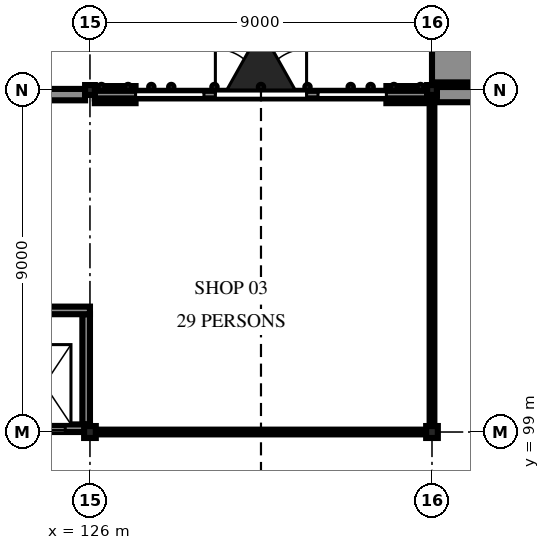
"""IFC4 building model, lengths in metres.
Left out: names, types, materials, properties, quantities, classifications, styles, units other than length and angle.
Written with IfcOpenShell. Run it as: python <this file> out.ifc"""

import sys

from ifc_helpers import new_model, si_unit, direction, frame, frame_2d, origin, origin_2d, place, context, subcontext, project, spatial, polyline, rectangle, i_section, outline, extrude, element, fill, save


model = new_model("IFC4")
c1 = context("Model", 3, precision=1e-05, world=origin(), true_north=direction((0.0, 1.0)))
c2 = subcontext(c1, "Body", "Model", "MODEL_VIEW")
j1 = project(units=[si_unit("LENGTHUNIT", "METRE"), si_unit("PLANEANGLEUNIT", "RADIAN")], contexts=[c1])
p1 = place(None, origin())
s1 = spatial("IfcSite", under=j1, at=p1, CompositionType="ELEMENT")
p2 = place(p1, origin())
s2 = spatial("IfcBuilding", under=s1, at=p2, CompositionType="ELEMENT")
p3 = place(p2, origin())
s3 = spatial("IfcBuildingStorey", under=s2, at=p3, CompositionType="ELEMENT", Elevation=0.0)
p4 = place(p3, frame((126.0, 99.0, -2.1), z_axis=(0.0, 0.0, 1.0), x_axis=(1.0, 0.0, 0.0)))
e1 = element("IfcColumn", 1, at=p4, inside=s3, PredefinedType="COLUMN", context=c2, shape_type="SweptSolid", body=[
    extrude(i_section(OverallWidth=0.307, OverallDepth=0.314, WebThickness=0.012, FlangeThickness=0.019, FilletRadius=0.015, at=origin_2d()), origin(), (0.0, 0.0, 1.0), 9.6),
])
p5 = place(p3, frame((126.0, 108.0, -2.1), z_axis=(0.0, 0.0, 1.0), x_axis=(1.0, 0.0, 0.0)))
e2 = element("IfcColumn", 2, at=p5, inside=s3, PredefinedType="COLUMN", context=c2, shape_type="SweptSolid", body=[
    extrude(i_section(OverallWidth=0.256, OverallDepth=0.26, WebThickness=0.01, FlangeThickness=0.017, FilletRadius=0.013, at=origin_2d()), origin(), (0.0, 0.0, 1.0), 9.6),
])
p6 = place(p3, frame((135.0, 99.0, -2.1), z_axis=(0.0, 0.0, 1.0), x_axis=(1.0, 0.0, 0.0)))
e3 = element("IfcColumn", 3, at=p6, inside=s3, PredefinedType="COLUMN", context=c2, shape_type="SweptSolid", body=[
    extrude(i_section(OverallWidth=0.307, OverallDepth=0.314, WebThickness=0.012, FlangeThickness=0.019, FilletRadius=0.015, at=origin_2d()), origin(), (0.0, 0.0, 1.0), 9.6),
])
p7 = place(p3, frame((135.0, 108.0, -2.1), z_axis=(0.0, 0.0, 1.0), x_axis=(1.0, 0.0, 0.0)))
e4 = element("IfcColumn", 4, at=p7, inside=s3, PredefinedType="COLUMN", context=c2, shape_type="SweptSolid", body=[
    extrude(i_section(OverallWidth=0.256, OverallDepth=0.26, WebThickness=0.01, FlangeThickness=0.017, FilletRadius=0.013, at=origin_2d()), origin(), (0.0, 0.0, 1.0), 9.6),
])
p8 = place(p3, frame((117.128, 107.878, 0.0), z_axis=(0.0, 0.0, 1.0), x_axis=(1.0, 0.0, 0.0)))
e5 = element("IfcWall", 5, at=p8, inside=s3, PredefinedType="SOLIDWALL", context=c2, shape_type="SweptSolid", body=[
    extrude(rectangle(XDim=8.744, YDim=0.3, at=frame_2d((4.372, 0.0))), origin(), (0.0, 0.0, 1.0), 6.692),
])
p9 = place(p8, frame((0.472, 0.0, 0.0)))
e6 = element("IfcOpeningElement", 6, at=p9, cuts=e5, PredefinedType="OPENING", context=c2, shape_type="SweptSolid", body=[
    extrude(rectangle(XDim=1.8, YDim=2.4, at=frame_2d((0.9, 1.2))), frame((0.0, 0.16, 0.0), z_axis=(0.0, -1.0, 0.0), x_axis=(1.0, 0.0, 0.0)), (0.0, 0.0, 1.0), 0.32),
])
p10 = place(p8, frame((0.772, 0.0, 2.55)))
e7 = element("IfcOpeningElement", 7, at=p10, cuts=e5, PredefinedType="OPENING", context=c2, shape_type="SweptSolid", body=[
    extrude(rectangle(XDim=1.2, YDim=0.6, at=frame_2d((0.6, 0.3))), frame((0.0, 0.16, 0.0), z_axis=(0.0, -1.0, 0.0), x_axis=(1.0, 0.0, 0.0)), (0.0, 0.0, 1.0), 0.32),
])
p11 = place(p8, frame((3.922, 0.0, 1.2)))
e8 = element("IfcOpeningElement", 8, at=p11, cuts=e5, PredefinedType="OPENING", context=c2, shape_type="SweptSolid", body=[
    extrude(rectangle(XDim=0.9, YDim=1.8, at=frame_2d((0.45, 0.9))), frame((0.0, 0.16, 0.0), z_axis=(0.0, -1.0, 0.0), x_axis=(1.0, 0.0, 0.0)), (0.0, 0.0, 1.0), 0.32),
])
p12 = place(p3, frame((126.128, 107.878, 0.0), z_axis=(0.0, 0.0, 1.0), x_axis=(1.0, 0.0, 0.0)))
e9 = element("IfcWall", 9, at=p12, inside=s3, PredefinedType="SOLIDWALL", context=c2, shape_type="SweptSolid", body=[
    extrude(rectangle(XDim=1.072, YDim=0.45, at=frame_2d((0.536, 0.0))), origin(), (0.0, 0.0, 1.0), 4.5),
])
p13 = place(p3, frame((129.0, 107.878, 0.0), z_axis=(0.0, 0.0, 1.0), x_axis=(1.0, 0.0, 0.0)))
e10 = element("IfcWall", 10, at=p13, inside=s3, PredefinedType="ELEMENTEDWALL", context=c2, shape_type="SweptSolid", body=[
    extrude(rectangle(XDim=3.0, YDim=0.15, at=frame_2d((1.5, 0.0))), origin(), (0.0, 0.0, 1.0), 4.5),
])
p14 = place(p13, frame((0.3, 0.0, 0.0)))
e11 = element("IfcOpeningElement", 11, at=p14, cuts=e10, PredefinedType="OPENING", context=c2, shape_type="SweptSolid", body=[
    extrude(rectangle(XDim=2.4, YDim=2.7, at=frame_2d((1.2, 1.35))), frame((0.0, 0.085, 0.0), z_axis=(0.0, -1.0, 0.0), x_axis=(1.0, 0.0, 0.0)), (0.0, 0.0, 1.0), 0.17),
])
p15 = place(p3, frame((133.8, 107.878, 0.0), z_axis=(0.0, 0.0, 1.0), x_axis=(1.0, 0.0, 0.0)))
e12 = element("IfcWall", 12, at=p15, inside=s3, PredefinedType="SOLIDWALL", context=c2, shape_type="SweptSolid", body=[
    extrude(rectangle(XDim=1.072, YDim=0.45, at=frame_2d((0.536, 0.0))), origin(), (0.0, 0.0, 1.0), 4.5),
])
p16 = place(p3, frame((126.128, 107.878, 4.9), z_axis=(0.0, 0.0, 1.0), x_axis=(1.0, 0.0, 0.0)))
e13 = element("IfcWall", 13, at=p16, inside=s3, PredefinedType="SOLIDWALL", context=c2, shape_type="SweptSolid", body=[
    extrude(rectangle(XDim=8.744, YDim=0.2, at=frame_2d((4.372, 0.0))), origin(), (0.0, 0.0, 1.0), 1.792),
])
p17 = place(p3, frame((135.128, 107.878, 0.0), z_axis=(0.0, 0.0, 1.0), x_axis=(1.0, 0.0, 0.0)))
e14 = element("IfcWall", 14, at=p17, inside=s3, PredefinedType="SOLIDWALL", context=c2, shape_type="SweptSolid", body=[
    extrude(rectangle(XDim=8.744, YDim=0.4, at=frame_2d((4.372, 0.0))), origin(), (0.0, 0.0, 1.0), 7.5),
])
p18 = place(p17, frame((2.872, 0.0, 0.0)))
e15 = element("IfcOpeningElement", 15, at=p18, cuts=e14, PredefinedType="OPENING", context=c2, shape_type="SweptSolid", body=[
    extrude(rectangle(XDim=3.0, YDim=3.6, at=frame_2d((1.5, 1.8))), frame((0.0, 0.21, 0.0), z_axis=(0.0, -1.0, 0.0), x_axis=(1.0, 0.0, 0.0)), (0.0, 0.0, 1.0), 0.42),
])
p19 = place(p3, frame((135.0, 108.7, -2.1), z_axis=(0.0, 0.0, 1.0), x_axis=(1.0, 0.0, 0.0)))
e16 = element("IfcWall", 16, at=p19, inside=s3, PredefinedType="SOLIDWALL", context=c2, shape_type="SweptSolid", body=[
    extrude(rectangle(XDim=3.0, YDim=1.0, at=frame_2d((1.5, 0.0))), origin(), (0.0, 0.0, 1.0), 26.1),
])
p20 = place(p3, frame((123.602, 99.1, -1.6), z_axis=(0.0, 0.0, 1.0), x_axis=(1.0, 0.0, 0.0)))
e17 = element("IfcWall", 17, at=p20, inside=s3, PredefinedType="SOLIDWALL", context=c2, shape_type="SweptSolid", body=[
    extrude(rectangle(XDim=2.398, YDim=0.2, at=frame_2d((1.199, 0.0))), origin(), (0.0, 0.0, 1.0), 8.357),
])
p21 = place(p20, frame((0.648, 0.0, 1.6)))
e18 = element("IfcOpeningElement", 18, at=p21, cuts=e17, PredefinedType="OPENING", context=c2, shape_type="SweptSolid", body=[
    extrude(rectangle(XDim=1.1, YDim=2.1, at=frame_2d((0.55, 1.05))), frame((0.0, 0.11, 0.0), z_axis=(0.0, -1.0, 0.0), x_axis=(1.0, 0.0, 0.0)), (0.0, 0.0, 1.0), 0.22),
])
p22 = place(p3, frame((123.602, 102.2, -1.6), z_axis=(0.0, 0.0, 1.0), x_axis=(1.0, 0.0, 0.0)))
e19 = element("IfcWall", 19, at=p22, inside=s3, PredefinedType="SOLIDWALL", context=c2, shape_type="SweptSolid", body=[
    extrude(rectangle(XDim=2.398, YDim=0.2, at=frame_2d((1.199, 0.0))), origin(), (0.0, 0.0, 1.0), 8.357),
])
p23 = place(p3, frame((125.9, 99.2, -1.6), z_axis=(0.0, 0.0, 1.0), x_axis=(0.0, 1.0, 0.0)))
e20 = element("IfcWall", 20, at=p23, inside=s3, PredefinedType="SOLIDWALL", context=c2, shape_type="SweptSolid", body=[
    extrude(rectangle(XDim=2.9, YDim=0.2, at=frame_2d((1.45, 0.0))), origin(), (0.0, 0.0, 1.0), 8.357),
])
p24 = place(p3, frame((126.154, 99.0, 0.0), z_axis=(0.0, 0.0, 1.0), x_axis=(1.0, 0.0, 0.0)))
e21 = element("IfcWall", 21, at=p24, inside=s3, PredefinedType="PARTITIONING", context=c2, shape_type="SweptSolid", body=[
    extrude(rectangle(XDim=8.692, YDim=0.125, at=frame_2d((4.346, 0.0))), origin(), (0.0, 0.0, 1.0), 6.757),
])
p25 = place(p3, frame((135.0, 99.157, 0.0), z_axis=(0.0, 0.0, 1.0), x_axis=(0.0, 1.0, 0.0)))
e22 = element("IfcWall", 22, at=p25, inside=s3, PredefinedType="PARTITIONING", context=c2, shape_type="SweptSolid", body=[
    extrude(rectangle(XDim=8.713, YDim=0.125, at=frame_2d((4.356, 0.0))), origin(), (0.0, 0.0, 1.0), 6.757),
])
p26 = place(p14, origin())
e23 = element("IfcDoor", 23, at=p26, inside=s3, OperationType="DOUBLE_DOOR_SINGLE_SWING", PredefinedType="DOOR", context=c2, shape_type="SweptSolid", body=[
    extrude(outline(polyline([(0.0, 0.0), (0.07, 0.0), (0.07, 2.63), (2.33, 2.63), (2.33, 0.0), (2.4, 0.0), (2.4, 2.7), (0.0, 2.7), (0.0, 0.0)])), frame((0.0, 0.025, 0.0), z_axis=(0.0, -1.0, 0.0), x_axis=(1.0, 0.0, 0.0)), (0.0, 0.0, 1.0), 0.05),
    extrude(outline(polyline([(0.074, 0.01), (1.197, 0.01), (1.197, 2.626), (0.074, 2.626), (0.074, 0.01)]), holes=[polyline([(0.164, 0.31), (1.107, 0.31), (1.107, 2.536), (0.164, 2.536), (0.164, 0.31)])]), frame((0.0, 0.017, 0.0), z_axis=(0.0, -1.0, 0.0), x_axis=(1.0, 0.0, 0.0)), (0.0, 0.0, 1.0), 0.035),
    extrude(rectangle(XDim=0.943, YDim=2.226, at=frame_2d((0.635, 1.423))), frame((0.0, 0.006, 0.0), z_axis=(0.0, -1.0, 0.0), x_axis=(1.0, 0.0, 0.0)), (0.0, 0.0, 1.0), 0.012),
    extrude(outline(polyline([(1.203, 0.01), (2.326, 0.01), (2.326, 2.626), (1.203, 2.626), (1.203, 0.01)]), holes=[polyline([(1.293, 0.31), (2.236, 0.31), (2.236, 2.536), (1.293, 2.536), (1.293, 0.31)])]), frame((0.0, 0.017, 0.0), z_axis=(0.0, -1.0, 0.0), x_axis=(1.0, 0.0, 0.0)), (0.0, 0.0, 1.0), 0.035),
    extrude(rectangle(XDim=0.943, YDim=2.226, at=frame_2d((1.764, 1.423))), frame((0.0, 0.006, 0.0), z_axis=(0.0, -1.0, 0.0), x_axis=(1.0, 0.0, 0.0)), (0.0, 0.0, 1.0), 0.012),
])
fill(e11, e23)
p27 = place(p21, origin())
e24 = element("IfcDoor", 24, at=p27, inside=s3, OperationType="SLIDING_TO_LEFT", PredefinedType="DOOR", context=c2, shape_type="SweptSolid", body=[
    extrude(outline(polyline([(0.0, 0.0), (0.07, 0.0), (0.07, 2.03), (1.03, 2.03), (1.03, 0.0), (1.1, 0.0), (1.1, 2.1), (0.0, 2.1), (0.0, 0.0)])), frame((0.0, 0.025, 0.0), z_axis=(0.0, -1.0, 0.0), x_axis=(1.0, 0.0, 0.0)), (0.0, 0.0, 1.0), 0.05),
    extrude(rectangle(XDim=0.524, YDim=2.016, at=frame_2d((0.336, 1.018))), frame((0.0, 0.018, 0.0), z_axis=(0.0, -1.0, 0.0), x_axis=(1.0, 0.0, 0.0)), (0.0, 0.0, 1.0), 0.016),
    extrude(rectangle(XDim=0.52, YDim=2.016, at=frame_2d((0.766, 1.018))), frame((0.0, -0.002, 0.0), z_axis=(0.0, -1.0, 0.0), x_axis=(1.0, 0.0, 0.0)), (0.0, 0.0, 1.0), 0.016),
])
fill(e18, e24)
save(model, sys.argv[1])
